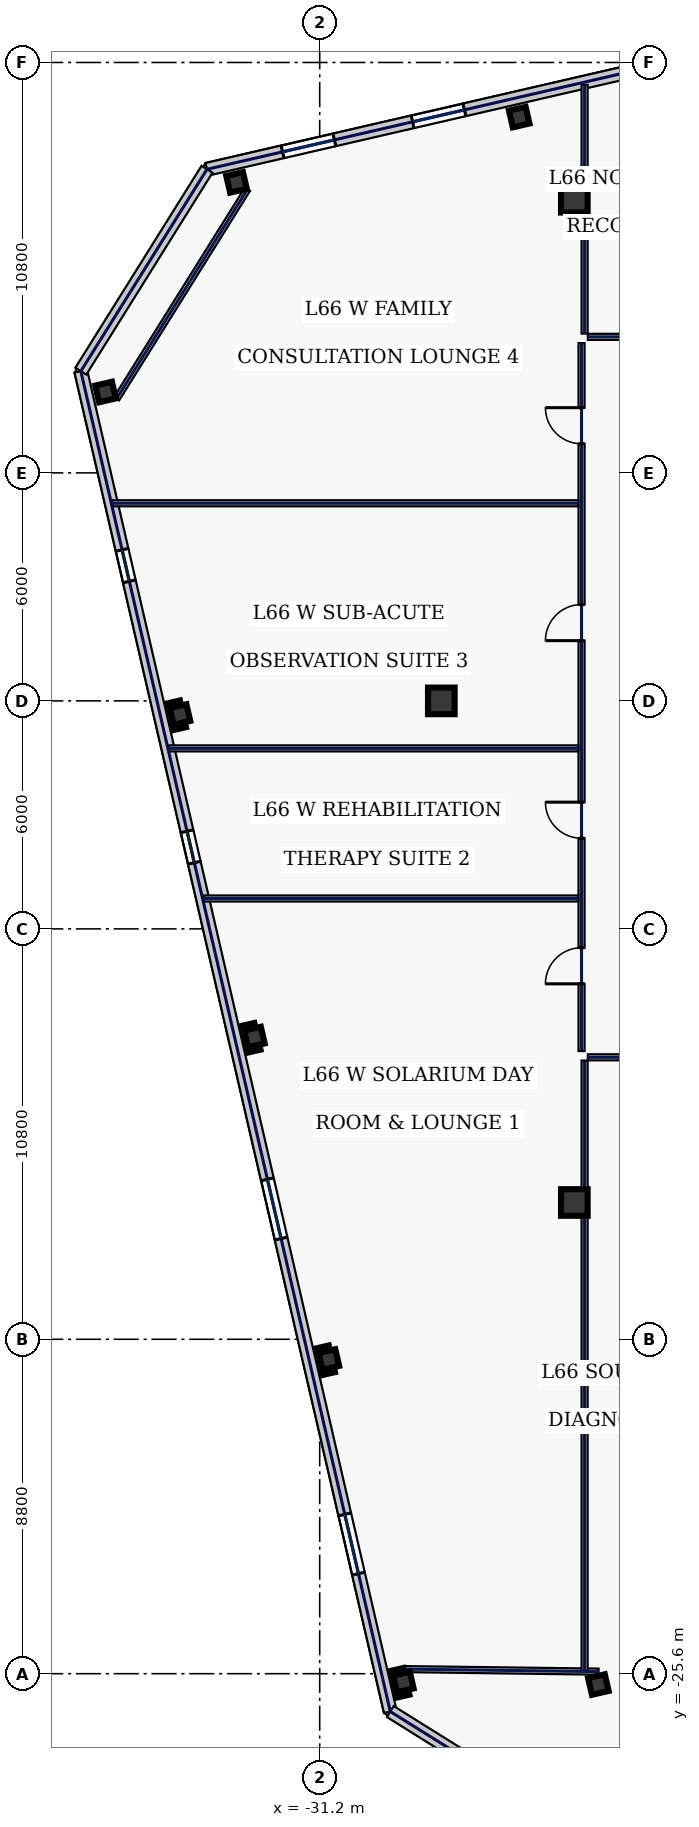
"""IFC4 building model, lengths in metres.
Left out: names, types, materials, properties, quantities, classifications, styles, units other than length and angle.
Written with IfcOpenShell. Run it as: python <this file> out.ifc"""

import sys

from ifc_helpers import new_model, si_unit, direction, frame, frame_2d, origin, origin_2d, place, context, subcontext, project, spatial, rectangle, hollow_rectangle, extrude, element, fill, save


model = new_model("IFC4")
c1 = context("Model", 3, precision=1e-05, world=origin(), true_north=direction((0.0, 1.0)))
c2 = subcontext(c1, "Body", "Model", "MODEL_VIEW")
j1 = project(units=[si_unit("LENGTHUNIT", "METRE"), si_unit("PLANEANGLEUNIT", "RADIAN")], contexts=[c1])
p1 = place(None, origin())
s1 = spatial("IfcSite", under=j1, at=p1, CompositionType="ELEMENT")
p2 = place(p1, origin())
s2 = spatial("IfcBuilding", under=s1, at=p2, CompositionType="ELEMENT")
p3 = place(p2, frame((0.0, 0.0, 285.0)))
s3 = spatial("IfcBuildingStorey", under=s2, at=p3, CompositionType="ELEMENT", Elevation=285.0)
for number, where, z_axis, x_axis in (
    (1, (-24.5, -13.2, 0.0), (0.0, 0.0, 1.0), (1.0, 0.0, 0.0)),
    (2, (-24.5, 13.2, 0.0), (0.0, 0.0, 1.0), (1.0, 0.0, 0.0)),
    (3, (-28.0, 0.0, 0.0), (0.0, 0.0, 1.0), (1.0, 0.0, 0.0)),
):
    element("IfcColumn", number, at=place(p3, frame(where, z_axis=z_axis, x_axis=x_axis)), inside=s3, PredefinedType="COLUMN", context=c2, shape_type="SweptSolid", body=[
        extrude(hollow_rectangle(XDim=0.7, YDim=0.7, WallThickness=0.032, at=origin_2d()), origin(), (0.0, 0.0, 1.0), 3.74),
    ])
for number, where, z_axis, x_axis in (
    (4, (-23.867, -25.886, 0.0), (0.0, 0.0, 1.0), (0.974, 0.225, 0.0)),
    (5, (-25.95, 15.362, 0.0), (0.0, 0.0, 1.0), (0.974, 0.225, 0.0)),
    (6, (-33.389, 13.645, 0.0), (0.0, 0.0, 1.0), (0.974, 0.225, 0.0)),
    (7, (-36.836, 8.128, 0.0), (0.0, 0.0, 1.0), (0.974, 0.225, 0.0)),
    (8, (-34.877, -0.359, 0.0), (0.0, 0.0, 1.0), (0.974, 0.225, 0.0)),
    (9, (-32.917, -8.845, 0.0), (0.0, 0.0, 1.0), (0.974, 0.225, 0.0)),
    (10, (-30.958, -17.332, 0.0), (0.0, 0.0, 1.0), (0.974, 0.225, 0.0)),
    (11, (-28.999, -25.819, 0.0), (0.0, 0.0, 1.0), (0.974, 0.225, 0.0)),
):
    element("IfcColumn", number, at=place(p3, frame(where, z_axis=z_axis, x_axis=x_axis)), inside=s3, PredefinedType="COLUMN", context=c2, shape_type="SweptSolid", body=[
        extrude(hollow_rectangle(XDim=0.45, YDim=0.45, WallThickness=0.022, at=origin_2d()), origin(), (0.0, 0.0, 1.0), 3.74),
    ])
p4 = place(p3, frame((-24.03, -29.916, 0.0), z_axis=(0.0, 0.0, 1.0), x_axis=(0.974371201193, 0.224946131964, 0.0)))
e12 = element("IfcWall", 12, at=p4, inside=s3, PredefinedType="STANDARD", context=c2, shape_type="SweptSolid", body=[
    extrude(rectangle(XDim=12.35, YDim=0.34, at=frame_2d((6.175, 0.0))), origin(), (0.0, 0.0, 1.0), 3.74),
])
p5 = place(p4, frame((2.35, 0.0, 0.9)))
e13 = element("IfcOpeningElement", 13, at=p5, cuts=e12, PredefinedType="OPENING", context=c2, shape_type="SweptSolid", body=[
    extrude(rectangle(XDim=1.5, YDim=2.0, at=frame_2d((0.75, 1.0))), frame((0.0, 0.18, 0.0), z_axis=(0.0, -1.0, 0.0), x_axis=(1.0, 0.0, 0.0)), (0.0, 0.0, 1.0), 0.36),
])
p6 = place(p4, frame((5.817, 0.0, 0.9)))
e14 = element("IfcOpeningElement", 14, at=p6, cuts=e12, PredefinedType="OPENING", context=c2, shape_type="SweptSolid", body=[
    extrude(rectangle(XDim=1.5, YDim=2.0, at=frame_2d((0.75, 1.0))), frame((0.0, 0.18, 0.0), z_axis=(0.0, -1.0, 0.0), x_axis=(1.0, 0.0, 0.0)), (0.0, 0.0, 1.0), 0.36),
])
p7 = place(p4, frame((10.537, 0.0, 0.9)))
e15 = element("IfcOpeningElement", 15, at=p7, cuts=e12, PredefinedType="OPENING", context=c2, shape_type="SweptSolid", body=[
    extrude(rectangle(XDim=0.85, YDim=1.85, at=frame_2d((0.425, 0.925))), frame((0.0, 0.18, 0.0), z_axis=(0.0, -1.0, 0.0), x_axis=(1.0, 0.0, 0.0)), (0.0, 0.0, 1.0), 0.36),
])
p8 = place(p3, frame((-17.245, 17.895, 0.0), z_axis=(0.0, 0.0, 1.0), x_axis=(-0.97437318493, -0.224937539085, 0.0)))
e16 = element("IfcWall", 16, at=p8, inside=s3, PredefinedType="STANDARD", context=c2, shape_type="SweptSolid", body=[
    extrude(rectangle(XDim=17.366, YDim=0.34, at=frame_2d((8.683, 0.0))), origin(), (0.0, 0.0, 1.0), 3.74),
])
p9 = place(p8, frame((13.925, 0.0, 1.0)))
e17 = element("IfcOpeningElement", 17, at=p9, cuts=e16, PredefinedType="OPENING", context=c2, shape_type="SweptSolid", body=[
    extrude(rectangle(XDim=1.4, YDim=1.85, at=frame_2d((0.7, 0.925))), frame((0.0, 0.18, 0.0), z_axis=(0.0, -1.0, 0.0), x_axis=(1.0, 0.0, 0.0)), (0.0, 0.0, 1.0), 0.36),
])
p10 = place(p8, frame((10.413, 0.0, 1.0)))
e18 = element("IfcOpeningElement", 18, at=p10, cuts=e16, PredefinedType="OPENING", context=c2, shape_type="SweptSolid", body=[
    extrude(rectangle(XDim=1.4, YDim=1.85, at=frame_2d((0.7, 0.925))), frame((0.0, 0.18, 0.0), z_axis=(0.0, -1.0, 0.0), x_axis=(1.0, 0.0, 0.0)), (0.0, 0.0, 1.0), 0.36),
])
p11 = place(p8, frame((3.329, 0.0, 1.0)))
e19 = element("IfcOpeningElement", 19, at=p11, cuts=e16, PredefinedType="OPENING", context=c2, shape_type="SweptSolid", body=[
    extrude(rectangle(XDim=0.85, YDim=1.85, at=frame_2d((0.425, 0.925))), frame((0.0, 0.18, 0.0), z_axis=(0.0, -1.0, 0.0), x_axis=(1.0, 0.0, 0.0)), (0.0, 0.0, 1.0), 0.36),
])
p12 = place(p3, frame((-37.486, 8.676, 0.0), z_axis=(0.0, 0.0, 1.0), x_axis=(0.224953091034, -0.974369594576, 0.0)))
e20 = element("IfcWall", 20, at=p12, inside=s3, PredefinedType="STANDARD", context=c2, shape_type="SweptSolid", body=[
    extrude(rectangle(XDim=36.2, YDim=0.34, at=frame_2d((18.1, 0.0))), origin(), (0.0, 0.0, 1.0), 3.74),
])
p13 = place(p12, frame((4.825, 0.0, 0.75)))
e21 = element("IfcOpeningElement", 21, at=p13, cuts=e20, PredefinedType="OPENING", context=c2, shape_type="SweptSolid", body=[
    extrude(rectangle(XDim=0.85, YDim=1.85, at=frame_2d((0.425, 0.925))), frame((0.0, 0.18, 0.0), z_axis=(0.0, -1.0, 0.0), x_axis=(1.0, 0.0, 0.0)), (0.0, 0.0, 1.0), 0.36),
])
p14 = place(p12, frame((12.425, 0.0, 0.75)))
e22 = element("IfcOpeningElement", 22, at=p14, cuts=e20, PredefinedType="OPENING", context=c2, shape_type="SweptSolid", body=[
    extrude(rectangle(XDim=0.85, YDim=1.85, at=frame_2d((0.425, 0.925))), frame((0.0, 0.18, 0.0), z_axis=(0.0, -1.0, 0.0), x_axis=(1.0, 0.0, 0.0)), (0.0, 0.0, 1.0), 0.36),
])
p15 = place(p12, frame((21.825, 0.0, 0.58)))
e23 = element("IfcOpeningElement", 23, at=p15, cuts=e20, PredefinedType="OPENING", context=c2, shape_type="SweptSolid", body=[
    extrude(rectangle(XDim=1.6, YDim=2.3, at=frame_2d((0.8, 1.15))), frame((0.0, 0.18, 0.0), z_axis=(0.0, -1.0, 0.0), x_axis=(1.0, 0.0, 0.0)), (0.0, 0.0, 1.0), 0.36),
])
p16 = place(p12, frame((30.875, 0.0, 0.58)))
e24 = element("IfcOpeningElement", 24, at=p16, cuts=e20, PredefinedType="OPENING", context=c2, shape_type="SweptSolid", body=[
    extrude(rectangle(XDim=1.6, YDim=2.3, at=frame_2d((0.8, 1.15))), frame((0.0, 0.18, 0.0), z_axis=(0.0, -1.0, 0.0), x_axis=(1.0, 0.0, 0.0)), (0.0, 0.0, 1.0), 0.36),
])
for number, where, z_axis, x_axis in (
    (25, (-34.166, 13.989, 0.0), (0.0, 0.0, 1.0), (-0.53, -0.848, 0.0)),
    (26, (-29.343, -26.596, 0.0), (0.0, 0.0, 1.0), (0.848, -0.53, 0.0)),
):
    element("IfcWall", number, at=place(p3, frame(where, z_axis=z_axis, x_axis=x_axis)), inside=s3, PredefinedType="STANDARD", context=c2, shape_type="SweptSolid", body=[
        extrude(rectangle(XDim=6.265, YDim=0.34, at=frame_2d((3.133, 0.0))), origin(), (0.0, 0.0, 1.0), 3.74),
    ])
p17 = place(p3, frame((-33.1, 13.465, 0.0), z_axis=(0.0, 0.0, 1.0), x_axis=(-0.529958457806, -0.848023604035, 0.0)))
e27 = element("IfcWall", 27, at=p17, inside=s3, PredefinedType="PARTITIONING", context=c2, shape_type="SweptSolid", body=[
    extrude(rectangle(XDim=6.505, YDim=0.16, at=frame_2d((3.252, 0.0))), origin(), (0.0, 0.0, 1.0), 3.74),
])
p18 = place(p3, frame((-28.994, -25.479, 0.0), z_axis=(0.0, 0.0, 1.0), x_axis=(0.999915052546, -0.01303409726, 0.0)))
e28 = element("IfcWall", 28, at=p18, inside=s3, PredefinedType="PARTITIONING", context=c2, shape_type="SweptSolid", body=[
    extrude(rectangle(XDim=5.132, YDim=0.16, at=frame_2d((2.566, 0.0))), origin(), (0.0, 0.0, 1.0), 3.74),
])
p19 = place(p3, frame((-24.31, -9.215, 0.0), z_axis=(0.0, 0.0, 1.0), x_axis=(0.0, 1.0, 0.0)))
e29 = element("IfcWall", 29, at=p19, inside=s3, PredefinedType="PARTITIONING", context=c2, shape_type="SweptSolid", body=[
    extrude(rectangle(XDim=18.63, YDim=0.16, at=frame_2d((9.315, 0.0))), origin(), (0.0, 0.0, 1.0), 3.74),
])
p20 = place(p19, frame((1.769, 0.0, 0.0)))
e30 = element("IfcOpeningElement", 30, at=p20, cuts=e29, PredefinedType="OPENING", context=c2, shape_type="SweptSolid", body=[
    extrude(rectangle(XDim=0.95, YDim=2.2, at=frame_2d((0.475, 1.1))), frame((0.0, 0.09, 0.0), z_axis=(0.0, -1.0, 0.0), x_axis=(1.0, 0.0, 0.0)), (0.0, 0.0, 1.0), 0.18),
])
p21 = place(p19, frame((5.6, 0.0, 0.0)))
e31 = element("IfcOpeningElement", 31, at=p21, cuts=e29, PredefinedType="OPENING", context=c2, shape_type="SweptSolid", body=[
    extrude(rectangle(XDim=0.95, YDim=2.2, at=frame_2d((0.475, 1.1))), frame((0.0, 0.09, 0.0), z_axis=(0.0, -1.0, 0.0), x_axis=(1.0, 0.0, 0.0)), (0.0, 0.0, 1.0), 0.18),
])
p22 = place(p19, frame((10.8, 0.0, 0.0)))
e32 = element("IfcOpeningElement", 32, at=p22, cuts=e29, PredefinedType="OPENING", context=c2, shape_type="SweptSolid", body=[
    extrude(rectangle(XDim=0.95, YDim=2.2, at=frame_2d((0.475, 1.1))), frame((0.0, 0.09, 0.0), z_axis=(0.0, -1.0, 0.0), x_axis=(1.0, 0.0, 0.0)), (0.0, 0.0, 1.0), 0.18),
])
p23 = place(p19, frame((15.981, 0.0, 0.0)))
e33 = element("IfcOpeningElement", 33, at=p23, cuts=e29, PredefinedType="OPENING", context=c2, shape_type="SweptSolid", body=[
    extrude(rectangle(XDim=0.95, YDim=2.2, at=frame_2d((0.475, 1.1))), frame((0.0, 0.09, 0.0), z_axis=(0.0, -1.0, 0.0), x_axis=(1.0, 0.0, 0.0)), (0.0, 0.0, 1.0), 0.18),
])
p24 = place(p3, frame((-24.145, 9.58, 0.0), z_axis=(0.0, 0.0, 1.0), x_axis=(1.0, 0.0, 0.0)))
e34 = element("IfcWall", 34, at=p24, inside=s3, PredefinedType="PARTITIONING", context=c2, shape_type="SweptSolid", body=[
    extrude(rectangle(XDim=48.29, YDim=0.16, at=frame_2d((24.145, 0.0))), origin(), (0.0, 0.0, 1.0), 3.74),
])
p25 = place(p24, frame((1.869, 0.0, 0.0)))
e35 = element("IfcOpeningElement", 35, at=p25, cuts=e34, PredefinedType="OPENING", context=c2, shape_type="SweptSolid", body=[
    extrude(rectangle(XDim=1.3, YDim=2.2, at=frame_2d((0.65, 1.1))), frame((0.0, 0.09, 0.0), z_axis=(0.0, -1.0, 0.0), x_axis=(1.0, 0.0, 0.0)), (0.0, 0.0, 1.0), 0.18),
])
p26 = place(p24, frame((10.015, 0.0, 0.0)))
e36 = element("IfcOpeningElement", 36, at=p26, cuts=e34, PredefinedType="OPENING", context=c2, shape_type="SweptSolid", body=[
    extrude(rectangle(XDim=0.95, YDim=2.2, at=frame_2d((0.475, 1.1))), frame((0.0, 0.09, 0.0), z_axis=(0.0, -1.0, 0.0), x_axis=(1.0, 0.0, 0.0)), (0.0, 0.0, 1.0), 0.18),
])
p27 = place(p24, frame((21.08, 0.0, 0.0)))
e37 = element("IfcOpeningElement", 37, at=p27, cuts=e34, PredefinedType="OPENING", context=c2, shape_type="SweptSolid", body=[
    extrude(rectangle(XDim=1.3, YDim=2.2, at=frame_2d((0.65, 1.1))), frame((0.0, 0.09, 0.0), z_axis=(0.0, -1.0, 0.0), x_axis=(1.0, 0.0, 0.0)), (0.0, 0.0, 1.0), 0.18),
])
p28 = place(p24, frame((31.805, 0.0, 0.0)))
e38 = element("IfcOpeningElement", 38, at=p28, cuts=e34, PredefinedType="OPENING", context=c2, shape_type="SweptSolid", body=[
    extrude(rectangle(XDim=1.05, YDim=2.2, at=frame_2d((0.525, 1.1))), frame((0.0, 0.09, 0.0), z_axis=(0.0, -1.0, 0.0), x_axis=(1.0, 0.0, 0.0)), (0.0, 0.0, 1.0), 0.18),
])
p29 = place(p24, frame((40.145, 0.0, 0.0)))
e39 = element("IfcOpeningElement", 39, at=p29, cuts=e34, PredefinedType="OPENING", context=c2, shape_type="SweptSolid", body=[
    extrude(rectangle(XDim=0.95, YDim=2.2, at=frame_2d((0.475, 1.1))), frame((0.0, 0.09, 0.0), z_axis=(0.0, -1.0, 0.0), x_axis=(1.0, 0.0, 0.0)), (0.0, 0.0, 1.0), 0.18),
])
p30 = place(p24, frame((45.466, 0.0, 0.0)))
e40 = element("IfcOpeningElement", 40, at=p30, cuts=e34, PredefinedType="OPENING", context=c2, shape_type="SweptSolid", body=[
    extrude(rectangle(XDim=0.95, YDim=2.2, at=frame_2d((0.475, 1.1))), frame((0.0, 0.09, 0.0), z_axis=(0.0, -1.0, 0.0), x_axis=(1.0, 0.0, 0.0)), (0.0, 0.0, 1.0), 0.18),
])
p31 = place(p3, frame((-15.065, -9.38, 0.0), z_axis=(0.0, 0.0, 1.0), x_axis=(-1.0, 0.0, 0.0)))
e41 = element("IfcWall", 41, at=p31, inside=s3, PredefinedType="PARTITIONING", context=c2, shape_type="SweptSolid", body=[
    extrude(rectangle(XDim=9.08, YDim=0.16, at=frame_2d((4.54, 0.0))), origin(), (0.0, 0.0, 1.0), 3.74),
])
p32 = place(p31, frame((6.256, 0.0, 0.0)))
e42 = element("IfcOpeningElement", 42, at=p32, cuts=e41, PredefinedType="OPENING", context=c2, shape_type="SweptSolid", body=[
    extrude(rectangle(XDim=0.95, YDim=2.2, at=frame_2d((0.475, 1.1))), frame((0.0, 0.09, 0.0), z_axis=(0.0, -1.0, 0.0), x_axis=(1.0, 0.0, 0.0)), (0.0, 0.0, 1.0), 0.18),
])
p33 = place(p3, frame((-24.23, 9.665, 0.0), z_axis=(0.0, 0.0, 1.0), x_axis=(0.0, 1.0, 0.0)))
e43 = element("IfcWall", 43, at=p33, inside=s3, PredefinedType="PARTITIONING", context=c2, shape_type="SweptSolid", body=[
    extrude(rectangle(XDim=6.546, YDim=0.16, at=frame_2d((3.273, 0.0))), origin(), (0.0, 0.0, 1.0), 3.74),
])
p34 = place(p3, frame((-24.23, -25.536, 0.0), z_axis=(0.0, 0.0, 1.0), x_axis=(0.0, 1.0, 0.0)))
e44 = element("IfcWall", 44, at=p34, inside=s3, PredefinedType="PARTITIONING", context=c2, shape_type="SweptSolid", body=[
    extrude(rectangle(XDim=16.071, YDim=0.16, at=frame_2d((8.035, 0.0))), origin(), (0.0, 0.0, 1.0), 3.335),
])
p35 = place(p3, frame((-34.262, -5.2, 0.0), z_axis=(0.0, 0.0, 1.0), x_axis=(1.0, 0.0, 0.0)))
e45 = element("IfcWall", 45, at=p35, inside=s3, PredefinedType="PARTITIONING", context=c2, shape_type="SweptSolid", body=[
    extrude(rectangle(XDim=9.867, YDim=0.16, at=frame_2d((4.933, 0.0))), origin(), (0.0, 0.0, 1.0), 3.74),
])
p36 = place(p3, frame((-35.174, -1.25, 0.0), z_axis=(0.0, 0.0, 1.0), x_axis=(1.0, 0.0, 0.0)))
e46 = element("IfcWall", 46, at=p36, inside=s3, PredefinedType="PARTITIONING", context=c2, shape_type="SweptSolid", body=[
    extrude(rectangle(XDim=10.779, YDim=0.16, at=frame_2d((5.389, 0.0))), origin(), (0.0, 0.0, 1.0), 3.74),
])
p37 = place(p3, frame((-36.663, 5.2, 0.0), z_axis=(0.0, 0.0, 1.0), x_axis=(1.0, 0.0, 0.0)))
e47 = element("IfcWall", 47, at=p37, inside=s3, PredefinedType="PARTITIONING", context=c2, shape_type="SweptSolid", body=[
    extrude(rectangle(XDim=12.268, YDim=0.16, at=frame_2d((6.134, 0.0))), origin(), (0.0, 0.0, 1.0), 3.74),
])
p38 = place(p9, origin())
e48 = element("IfcWindow", 48, at=p38, inside=s3, PartitioningType="SINGLE_PANEL", PredefinedType="WINDOW", context=c2, shape_type="SweptSolid", body=[
    extrude(rectangle(XDim=1.4, YDim=1.85, at=frame_2d((0.7, 0.925))), frame((0.0, 0.03, 0.0), z_axis=(0.0, -1.0, 0.0), x_axis=(1.0, 0.0, 0.0)), (0.0, 0.0, 1.0), 0.06),
])
fill(e17, e48)
p39 = place(p10, origin())
e49 = element("IfcWindow", 49, at=p39, inside=s3, PartitioningType="SINGLE_PANEL", PredefinedType="WINDOW", context=c2, shape_type="SweptSolid", body=[
    extrude(rectangle(XDim=1.4, YDim=1.85, at=frame_2d((0.7, 0.925))), frame((0.0, 0.03, 0.0), z_axis=(0.0, -1.0, 0.0), x_axis=(1.0, 0.0, 0.0)), (0.0, 0.0, 1.0), 0.06),
])
fill(e18, e49)
p40 = place(p13, origin())
e50 = element("IfcWindow", 50, at=p40, inside=s3, PartitioningType="SINGLE_PANEL", PredefinedType="WINDOW", context=c2, shape_type="SweptSolid", body=[
    extrude(rectangle(XDim=0.85, YDim=1.85, at=frame_2d((0.425, 0.925))), frame((0.0, 0.03, 0.0), z_axis=(0.0, -1.0, 0.0), x_axis=(1.0, 0.0, 0.0)), (0.0, 0.0, 1.0), 0.06),
])
fill(e21, e50)
p41 = place(p14, origin())
e51 = element("IfcWindow", 51, at=p41, inside=s3, PartitioningType="SINGLE_PANEL", PredefinedType="WINDOW", context=c2, shape_type="SweptSolid", body=[
    extrude(rectangle(XDim=0.85, YDim=1.85, at=frame_2d((0.425, 0.925))), frame((0.0, 0.03, 0.0), z_axis=(0.0, -1.0, 0.0), x_axis=(1.0, 0.0, 0.0)), (0.0, 0.0, 1.0), 0.06),
])
fill(e22, e51)
p42 = place(p15, origin())
e52 = element("IfcWindow", 52, at=p42, inside=s3, PartitioningType="SINGLE_PANEL", PredefinedType="WINDOW", context=c2, shape_type="SweptSolid", body=[
    extrude(rectangle(XDim=1.6, YDim=2.3, at=frame_2d((0.8, 1.15))), frame((0.0, 0.03, 0.0), z_axis=(0.0, -1.0, 0.0), x_axis=(1.0, 0.0, 0.0)), (0.0, 0.0, 1.0), 0.06),
])
fill(e23, e52)
p43 = place(p16, origin())
e53 = element("IfcWindow", 53, at=p43, inside=s3, PartitioningType="SINGLE_PANEL", PredefinedType="WINDOW", context=c2, shape_type="SweptSolid", body=[
    extrude(rectangle(XDim=1.6, YDim=2.3, at=frame_2d((0.8, 1.15))), frame((0.0, 0.03, 0.0), z_axis=(0.0, -1.0, 0.0), x_axis=(1.0, 0.0, 0.0)), (0.0, 0.0, 1.0), 0.06),
])
fill(e24, e53)
p44 = place(p20, origin())
e54 = element("IfcDoor", 54, at=p44, inside=s3, OperationType="SINGLE_SWING_LEFT", PredefinedType="DOOR", context=c2, shape_type="SweptSolid", body=[
    extrude(rectangle(XDim=0.95, YDim=2.2, at=frame_2d((0.475, 1.1))), frame((0.0, 0.025, 0.0), z_axis=(0.0, -1.0, 0.0), x_axis=(1.0, 0.0, 0.0)), (0.0, 0.0, 1.0), 0.05),
])
fill(e30, e54)
p45 = place(p21, origin())
e55 = element("IfcDoor", 55, at=p45, inside=s3, OperationType="SINGLE_SWING_RIGHT", PredefinedType="DOOR", context=c2, shape_type="SweptSolid", body=[
    extrude(rectangle(XDim=0.95, YDim=2.2, at=frame_2d((0.475, 1.1))), frame((0.0, 0.025, 0.0), z_axis=(0.0, -1.0, 0.0), x_axis=(1.0, 0.0, 0.0)), (0.0, 0.0, 1.0), 0.05),
])
fill(e31, e55)
p46 = place(p22, origin())
e56 = element("IfcDoor", 56, at=p46, inside=s3, OperationType="SINGLE_SWING_LEFT", PredefinedType="DOOR", context=c2, shape_type="SweptSolid", body=[
    extrude(rectangle(XDim=0.95, YDim=2.2, at=frame_2d((0.475, 1.1))), frame((0.0, 0.025, 0.0), z_axis=(0.0, -1.0, 0.0), x_axis=(1.0, 0.0, 0.0)), (0.0, 0.0, 1.0), 0.05),
])
fill(e32, e56)
p47 = place(p23, origin())
e57 = element("IfcDoor", 57, at=p47, inside=s3, OperationType="SINGLE_SWING_RIGHT", PredefinedType="DOOR", context=c2, shape_type="SweptSolid", body=[
    extrude(rectangle(XDim=0.95, YDim=2.2, at=frame_2d((0.475, 1.1))), frame((0.0, 0.025, 0.0), z_axis=(0.0, -1.0, 0.0), x_axis=(1.0, 0.0, 0.0)), (0.0, 0.0, 1.0), 0.05),
])
fill(e33, e57)
save(model, sys.argv[1])
